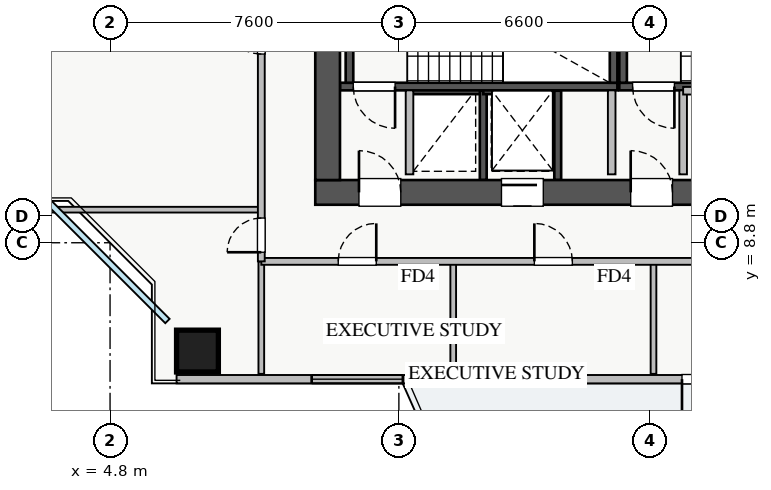
"""IFC4 building model, lengths in metres.
Left out: names, types, materials, properties, quantities, classifications, styles, units other than length and angle.
Written with IfcOpenShell. Run it as: python <this file> out.ifc"""

import sys

from ifc_helpers import new_model, si_unit, direction, frame, frame_2d, origin, origin_2d, place, context, subcontext, project, spatial, rectangle, extrude, source, transform, mapped, element, fill, save


model = new_model("IFC4")
c1 = context("Model", 3, precision=1e-05, world=origin(), true_north=direction((0.0, 1.0)))
c2 = subcontext(c1, "Body", "Model", "MODEL_VIEW")
j1 = project(units=[si_unit("LENGTHUNIT", "METRE"), si_unit("PLANEANGLEUNIT", "RADIAN")], contexts=[c1])
p1 = place(None, origin())
s1 = spatial("IfcSite", under=j1, at=p1, CompositionType="ELEMENT")
p2 = place(p1, origin())
s2 = spatial("IfcBuilding", under=s1, at=p2, CompositionType="ELEMENT")
p3 = place(p2, frame((0.0, 0.0, 110.0)))
s3 = spatial("IfcBuildingStorey", under=s2, at=p3, CompositionType="ELEMENT", Elevation=110.0)
p4 = place(p3, frame((12.68, 12.8, 0.0), z_axis=(0.0, 0.0, 1.0), x_axis=(1.0, 0.0, 0.0)))
e1 = element("IfcWall", 1, at=p4, inside=s3, PredefinedType="SHEAR", context=c2, shape_type="SweptSolid", body=[
    extrude(rectangle(XDim=1.94, YDim=0.18, at=frame_2d((0.97, 0.0))), origin(), (0.0, 0.0, 1.0), 3.07),
])
p5 = place(p3, frame((14.62, 10.45, 0.0), z_axis=(0.0, 0.0, 1.0), x_axis=(0.0, 1.0, 0.0)))
e2 = element("IfcWall", 2, at=p5, inside=s3, PredefinedType="SHEAR", context=c2, shape_type="SweptSolid", body=[
    extrude(rectangle(XDim=2.35, YDim=0.18, at=frame_2d((1.175, 0.0))), origin(), (0.0, 0.0, 1.0), 3.07),
])
p6 = place(p3, frame((14.62, 12.8, 0.0), z_axis=(0.0, 0.0, 1.0), x_axis=(1.0, 0.0, 0.0)))
e3 = element("IfcWall", 3, at=p6, inside=s3, PredefinedType="SHEAR", context=c2, shape_type="SweptSolid", body=[
    extrude(rectangle(XDim=1.96, YDim=0.18, at=frame_2d((0.98, 0.0))), origin(), (0.0, 0.0, 1.0), 3.07),
])
p7 = place(p3, frame((16.58, 10.45, 0.0), z_axis=(0.0, 0.0, 1.0), x_axis=(0.0, 1.0, 0.0)))
e4 = element("IfcWall", 4, at=p7, inside=s3, PredefinedType="SHEAR", context=c2, shape_type="SweptSolid", body=[
    extrude(rectangle(XDim=2.35, YDim=0.18, at=frame_2d((1.175, 0.0))), origin(), (0.0, 0.0, 1.0), 3.07),
])
p8 = place(p3, frame((10.85, 12.91, 0.0), z_axis=(0.0, 0.0, 1.0), x_axis=(1.0, 0.0, 0.0)))
e5 = element("IfcWall", 5, at=p8, inside=s3, PredefinedType="SHEAR", context=c2, shape_type="SweptSolid", body=[
    extrude(rectangle(XDim=7.3, YDim=0.2, at=frame_2d((3.65, 0.0))), origin(), (0.0, 0.0, 1.0), 3.25),
])
p9 = place(p8, frame((0.35, 0.0, 0.0)))
e6 = element("IfcOpeningElement", 6, at=p9, cuts=e5, PredefinedType="OPENING", context=c2, shape_type="SweptSolid", body=[
    extrude(rectangle(XDim=1.1, YDim=2.05, at=frame_2d((0.55, 1.025))), frame((0.0, 0.11, 0.0), z_axis=(0.0, -1.0, 0.0), x_axis=(1.0, 0.0, 0.0)), (0.0, 0.0, 1.0), 0.22),
])
for number, where, z_axis, x_axis in (
    (7, (11.1, 13.01, 0.0), (0.0, 0.0, 1.0), (0.0, 1.0, 0.0)),
    (8, (18.05, 13.01, 0.0), (0.0, 0.0, 1.0), (0.0, 1.0, 0.0)),
):
    element("IfcWall", number, at=place(p3, frame(where, z_axis=z_axis, x_axis=x_axis)), inside=s3, PredefinedType="SHEAR", context=c2, shape_type="SweptSolid", body=[
        extrude(rectangle(XDim=2.94, YDim=0.2, at=frame_2d((1.47, 0.0))), origin(), (0.0, 0.0, 1.0), 3.25),
    ])
p10 = place(p3, frame((18.2, 12.91, 0.0), z_axis=(0.0, 0.0, 1.0), x_axis=(1.0, 0.0, 0.0)))
e9 = element("IfcWall", 9, at=p10, inside=s3, PredefinedType="SHEAR", context=c2, shape_type="SweptSolid", body=[
    extrude(rectangle(XDim=7.15, YDim=0.2, at=frame_2d((3.575, 0.0))), origin(), (0.0, 0.0, 1.0), 3.25),
])
p11 = place(p10, frame((0.35, 0.0, 0.0)))
e10 = element("IfcOpeningElement", 10, at=p11, cuts=e9, PredefinedType="OPENING", context=c2, shape_type="SweptSolid", body=[
    extrude(rectangle(XDim=1.1, YDim=2.05, at=frame_2d((0.55, 1.025))), frame((0.0, 0.11, 0.0), z_axis=(0.0, -1.0, 0.0), x_axis=(1.0, 0.0, 0.0)), (0.0, 0.0, 1.0), 0.22),
])
p12 = place(p3, frame((18.3, 13.01, 0.0), z_axis=(0.0, 0.0, 1.0), x_axis=(0.0, 1.0, 0.0)))
e11 = element("IfcWall", 11, at=p12, inside=s3, PredefinedType="SHEAR", context=c2, shape_type="SweptSolid", body=[
    extrude(rectangle(XDim=2.94, YDim=0.2, at=frame_2d((1.47, 0.0))), origin(), (0.0, 0.0, 1.0), 3.25),
])
p13 = place(p3, frame((10.2, 10.125, 0.0), z_axis=(0.0, 0.0, 1.0), x_axis=(1.0, 0.0, 0.0)))
e12 = element("IfcWall", 12, at=p13, inside=s3, PredefinedType="SHEAR", context=c2, shape_type="SweptSolid", body=[
    extrude(rectangle(XDim=17.6, YDim=0.65, at=frame_2d((8.8, 0.0))), origin(), (0.0, 0.0, 1.0), 3.25),
])
p14 = place(p13, frame((1.15, 0.0, 0.0)))
e13 = element("IfcOpeningElement", 13, at=p14, cuts=e12, PredefinedType="OPENING", context=c2, shape_type="SweptSolid", body=[
    extrude(rectangle(XDim=1.1, YDim=2.05, at=frame_2d((0.55, 1.025))), frame((0.0, 0.335, 0.0), z_axis=(0.0, -1.0, 0.0), x_axis=(1.0, 0.0, 0.0)), (0.0, 0.0, 1.0), 0.67),
])
p15 = place(p13, frame((8.3, 0.0, 0.0)))
e14 = element("IfcOpeningElement", 14, at=p15, cuts=e12, PredefinedType="OPENING", context=c2, shape_type="SweptSolid", body=[
    extrude(rectangle(XDim=1.1, YDim=2.05, at=frame_2d((0.55, 1.025))), frame((0.0, 0.335, 0.0), z_axis=(0.0, -1.0, 0.0), x_axis=(1.0, 0.0, 0.0)), (0.0, 0.0, 1.0), 0.67),
])
p16 = place(p13, frame((4.9, 0.0, 0.0)))
e15 = element("IfcOpeningElement", 15, at=p16, cuts=e12, PredefinedType="OPENING", context=c2, shape_type="SweptSolid", body=[
    extrude(rectangle(XDim=1.1, YDim=2.05, at=frame_2d((0.55, 1.025))), frame((0.0, 0.335, 0.0), z_axis=(0.0, -1.0, 0.0), x_axis=(1.0, 0.0, 0.0)), (0.0, 0.0, 1.0), 0.67),
])
p17 = place(p13, frame((14.74, 0.0, 0.0)))
e16 = element("IfcOpeningElement", 16, at=p17, cuts=e12, PredefinedType="OPENING", context=c2, shape_type="SweptSolid", body=[
    extrude(rectangle(XDim=1.0, YDim=2.05, at=frame_2d((0.5, 1.025))), frame((0.0, 0.335, 0.0), z_axis=(0.0, -1.0, 0.0), x_axis=(1.0, 0.0, 0.0)), (0.0, 0.0, 1.0), 0.67),
])
p18 = place(p13, frame((10.64, 0.0, 0.0)))
e17 = element("IfcOpeningElement", 17, at=p18, cuts=e12, PredefinedType="OPENING", context=c2, shape_type="SweptSolid", body=[
    extrude(rectangle(XDim=1.0, YDim=2.05, at=frame_2d((0.5, 1.025))), frame((0.0, 0.335, 0.0), z_axis=(0.0, -1.0, 0.0), x_axis=(1.0, 0.0, 0.0)), (0.0, 0.0, 1.0), 0.67),
])
p19 = place(p13, frame((13.09, 0.0, 0.0)))
e18 = element("IfcOpeningElement", 18, at=p19, cuts=e12, PredefinedType="OPENING", context=c2, shape_type="SweptSolid", body=[
    extrude(rectangle(XDim=1.0, YDim=2.05, at=frame_2d((0.5, 1.025))), frame((0.0, 0.335, 0.0), z_axis=(0.0, -1.0, 0.0), x_axis=(1.0, 0.0, 0.0)), (0.0, 0.0, 1.0), 0.67),
])
p20 = place(p3, frame((10.525, 10.45, 0.0), z_axis=(0.0, 0.0, 1.0), x_axis=(0.0, 1.0, 0.0)))
e19 = element("IfcWall", 19, at=p20, inside=s3, PredefinedType="SHEAR", context=c2, shape_type="SweptSolid", body=[
    extrude(rectangle(XDim=5.9, YDim=0.65, at=frame_2d((2.95, 0.0))), origin(), (0.0, 0.0, 1.0), 3.25),
])
m1 = source(origin(), c2, "Body", "SweptSolid", [
    extrude(rectangle(XDim=1.1, YDim=1.1, at=origin_2d()), origin(), (0.0, 0.0, 1.0), 3.25),
])
p21 = place(p3, frame((7.1, 5.95, 0.0), z_axis=(0.0, 0.0, 1.0), x_axis=(1.0, 0.0, 0.0)))
e20 = element("IfcColumn", 20, at=p21, inside=s3, PredefinedType="COLUMN", context=c2, shape_type="MappedRepresentation", body=[
    mapped(m1, transform((0.0, 0.0, 0.0), x_axis=(1.0, 0.0, 0.0), y_axis=(0.0, 1.0, 0.0), z_axis=(0.0, 0.0, 1.0), scale=1.0)),
])
p22 = place(p3, frame((6.55, 5.21, 0.0), z_axis=(0.0, 0.0, 1.0), x_axis=(1.0, 0.0, 0.0)))
e21 = element("IfcWall", 21, at=p22, inside=s3, PredefinedType="STANDARD", context=c2, shape_type="SweptSolid", body=[
    extrude(rectangle(XDim=24.9, YDim=0.22, at=frame_2d((12.45, 0.0))), origin(), (0.0, 0.0, 1.0), 2.61),
])
p23 = place(p22, frame((13.3, 0.0, 0.0)))
e22 = element("IfcOpeningElement", 22, at=p23, cuts=e21, PredefinedType="OPENING", context=c2, shape_type="SweptSolid", body=[
    extrude(rectangle(XDim=1.2, YDim=2.1, at=frame_2d((0.6, 1.05))), frame((0.0, 0.12, 0.0), z_axis=(0.0, -1.0, 0.0), x_axis=(1.0, 0.0, 0.0)), (0.0, 0.0, 1.0), 0.24),
])
p24 = place(p22, frame((3.555, 0.0, 0.9)))
e23 = element("IfcOpeningElement", 23, at=p24, cuts=e21, PredefinedType="OPENING", context=c2, shape_type="SweptSolid", body=[
    extrude(rectangle(XDim=2.4, YDim=1.5, at=frame_2d((1.2, 0.75))), frame((0.0, 0.12, 0.0), z_axis=(0.0, -1.0, 0.0), x_axis=(1.0, 0.0, 0.0)), (0.0, 0.0, 1.0), 0.24),
])
p25 = place(p22, frame((8.438, 0.0, 0.9)))
e24 = element("IfcOpeningElement", 24, at=p25, cuts=e21, PredefinedType="OPENING", context=c2, shape_type="SweptSolid", body=[
    extrude(rectangle(XDim=1.8, YDim=1.45, at=frame_2d((0.9, 0.725))), frame((0.0, 0.12, 0.0), z_axis=(0.0, -1.0, 0.0), x_axis=(1.0, 0.0, 0.0)), (0.0, 0.0, 1.0), 0.24),
])
p26 = place(p22, frame((14.813, 0.0, 0.9)))
e25 = element("IfcOpeningElement", 25, at=p26, cuts=e21, PredefinedType="OPENING", context=c2, shape_type="SweptSolid", body=[
    extrude(rectangle(XDim=1.5, YDim=1.45, at=frame_2d((0.75, 0.725))), frame((0.0, 0.12, 0.0), z_axis=(0.0, -1.0, 0.0), x_axis=(1.0, 0.0, 0.0)), (0.0, 0.0, 1.0), 0.24),
])
p27 = place(p22, frame((20.738, 0.0, 0.9)))
e26 = element("IfcOpeningElement", 26, at=p27, cuts=e21, PredefinedType="OPENING", context=c2, shape_type="SweptSolid", body=[
    extrude(rectangle(XDim=2.1, YDim=1.48, at=frame_2d((1.05, 0.74))), frame((0.0, 0.12, 0.0), z_axis=(0.0, -1.0, 0.0), x_axis=(1.0, 0.0, 0.0)), (0.0, 0.0, 1.0), 0.24),
])
for number, where, z_axis, x_axis in (
    (27, (12.68, 10.6, 0.0), (0.0, 0.0, 1.0), (0.0, 1.0, 0.0)),
    (28, (18.0, 10.6, 0.0), (0.0, 0.0, 1.0), (0.0, 1.0, 0.0)),
    (29, (19.88, 10.6, 0.0), (0.0, 0.0, 1.0), (0.0, 1.0, 0.0)),
):
    element("IfcWall", number, at=place(p3, frame(where, z_axis=z_axis, x_axis=x_axis)), inside=s3, PredefinedType="PARTITIONING", context=c2, shape_type="SweptSolid", body=[
        extrude(rectangle(XDim=2.21, YDim=0.2, at=frame_2d((1.105, 0.0))), origin(), (0.0, 0.0, 1.0), 3.07),
    ])
p28 = place(p3, frame((19.88, 12.8, 0.0), z_axis=(0.0, 0.0, 1.0), x_axis=(1.0, 0.0, 0.0)))
e30 = element("IfcWall", 30, at=p28, inside=s3, PredefinedType="PARTITIONING", context=c2, shape_type="SweptSolid", body=[
    extrude(rectangle(XDim=1.87, YDim=0.2, at=frame_2d((0.935, 0.0))), origin(), (0.0, 0.0, 1.0), 3.07),
])
p29 = place(p3, frame((13.83, 5.35, 0.0), z_axis=(0.0, 0.0, 1.0), x_axis=(0.0, 1.0, 0.0)))
e31 = element("IfcWall", 31, at=p29, inside=s3, PredefinedType="PARTITIONING", context=c2, shape_type="SweptSolid", body=[
    extrude(rectangle(XDim=2.96, YDim=0.15, at=frame_2d((1.48, 0.0))), origin(), (0.0, 0.0, 1.0), 3.07),
])
p30 = place(p3, frame((19.1, 5.35, 0.0), z_axis=(0.0, 0.0, 1.0), x_axis=(0.0, 1.0, 0.0)))
e32 = element("IfcWall", 32, at=p30, inside=s3, PredefinedType="PARTITIONING", context=c2, shape_type="SweptSolid", body=[
    extrude(rectangle(XDim=2.96, YDim=0.15, at=frame_2d((1.48, 0.0))), origin(), (0.0, 0.0, 1.0), 2.765),
])
p31 = place(p3, frame((8.78, 5.35, 0.0), z_axis=(0.0, 0.0, 1.0), x_axis=(0.0, 1.0, 0.0)))
e33 = element("IfcWall", 33, at=p31, inside=s3, PredefinedType="PARTITIONING", context=c2, shape_type="SweptSolid", body=[
    extrude(rectangle(XDim=2.96, YDim=0.15, at=frame_2d((1.48, 0.0))), origin(), (0.0, 0.0, 1.0), 3.07),
])
p32 = place(p3, frame((8.78, 8.31, 0.0), z_axis=(0.0, 0.0, 1.0), x_axis=(1.0, 0.0, 0.0)))
e34 = element("IfcWall", 34, at=p32, inside=s3, PredefinedType="PARTITIONING", context=c2, shape_type="SweptSolid", body=[
    extrude(rectangle(XDim=23.54, YDim=0.18, at=frame_2d((11.77, 0.0))), origin(), (0.0, 0.0, 1.0), 3.07),
])
p33 = place(p32, frame((2.025, 0.0, 0.0)))
e35 = element("IfcOpeningElement", 35, at=p33, cuts=e34, PredefinedType="OPENING", context=c2, shape_type="SweptSolid", body=[
    extrude(rectangle(XDim=1.0, YDim=2.05, at=frame_2d((0.5, 1.025))), frame((0.0, 0.1, 0.0), z_axis=(0.0, -1.0, 0.0), x_axis=(1.0, 0.0, 0.0)), (0.0, 0.0, 1.0), 0.2),
])
p34 = place(p32, frame((7.185, 0.0, 0.0)))
e36 = element("IfcOpeningElement", 36, at=p34, cuts=e34, PredefinedType="OPENING", context=c2, shape_type="SweptSolid", body=[
    extrude(rectangle(XDim=1.0, YDim=2.05, at=frame_2d((0.5, 1.025))), frame((0.0, 0.1, 0.0), z_axis=(0.0, -1.0, 0.0), x_axis=(1.0, 0.0, 0.0)), (0.0, 0.0, 1.0), 0.2),
])
p35 = place(p32, frame((13.36, 0.0, 0.0)))
e37 = element("IfcOpeningElement", 37, at=p35, cuts=e34, PredefinedType="OPENING", context=c2, shape_type="SweptSolid", body=[
    extrude(rectangle(XDim=1.0, YDim=2.05, at=frame_2d((0.5, 1.025))), frame((0.0, 0.1, 0.0), z_axis=(0.0, -1.0, 0.0), x_axis=(1.0, 0.0, 0.0)), (0.0, 0.0, 1.0), 0.2),
])
p36 = place(p32, frame((19.8, 0.0, 0.0)))
e38 = element("IfcOpeningElement", 38, at=p36, cuts=e34, PredefinedType="OPENING", context=c2, shape_type="SweptSolid", body=[
    extrude(rectangle(XDim=1.0, YDim=2.05, at=frame_2d((0.5, 1.025))), frame((0.0, 0.1, 0.0), z_axis=(0.0, -1.0, 0.0), x_axis=(1.0, 0.0, 0.0)), (0.0, 0.0, 1.0), 0.2),
])
p37 = place(p3, frame((1.35, 9.67, 0.0), z_axis=(0.0, 0.0, 1.0), x_axis=(1.0, 0.0, 0.0)))
e39 = element("IfcWall", 39, at=p37, inside=s3, PredefinedType="PARTITIONING", context=c2, shape_type="SweptSolid", body=[
    extrude(rectangle(XDim=7.43, YDim=0.15, at=frame_2d((3.715, 0.0))), origin(), (0.0, 0.0, 1.0), 3.07),
])
p38 = place(p3, frame((8.78, 8.31, 0.0), z_axis=(0.0, 0.0, 1.0), x_axis=(0.0, 1.0, 0.0)))
e40 = element("IfcWall", 40, at=p38, inside=s3, PredefinedType="PARTITIONING", context=c2, shape_type="SweptSolid", body=[
    extrude(rectangle(XDim=29.34, YDim=0.18, at=frame_2d((14.67, 0.0))), origin(), (0.0, 0.0, 1.0), 3.07),
])
p39 = place(p38, frame((28.045, 0.0, 0.0)))
e41 = element("IfcOpeningElement", 41, at=p39, cuts=e40, PredefinedType="OPENING", context=c2, shape_type="SweptSolid", body=[
    extrude(rectangle(XDim=0.9, YDim=2.05, at=frame_2d((0.45, 1.025))), frame((0.0, 0.1, 0.0), z_axis=(0.0, -1.0, 0.0), x_axis=(1.0, 0.0, 0.0)), (0.0, 0.0, 1.0), 0.2),
])
p40 = place(p38, frame((0.24, 0.0, 0.0)))
e42 = element("IfcOpeningElement", 42, at=p40, cuts=e40, PredefinedType="OPENING", context=c2, shape_type="SweptSolid", body=[
    extrude(rectangle(XDim=0.9, YDim=2.05, at=frame_2d((0.45, 1.025))), frame((0.0, 0.1, 0.0), z_axis=(0.0, -1.0, 0.0), x_axis=(1.0, 0.0, 0.0)), (0.0, 0.0, 1.0), 0.2),
])
p41 = place(p38, frame((5.455, 0.0, 0.0)))
e43 = element("IfcOpeningElement", 43, at=p41, cuts=e40, PredefinedType="OPENING", context=c2, shape_type="SweptSolid", body=[
    extrude(rectangle(XDim=1.0, YDim=2.05, at=frame_2d((0.5, 1.025))), frame((0.0, 0.1, 0.0), z_axis=(0.0, -1.0, 0.0), x_axis=(1.0, 0.0, 0.0)), (0.0, 0.0, 1.0), 0.2),
])
p42 = place(p38, frame((11.865, 0.0, 0.0)))
e44 = element("IfcOpeningElement", 44, at=p42, cuts=e40, PredefinedType="OPENING", context=c2, shape_type="SweptSolid", body=[
    extrude(rectangle(XDim=1.0, YDim=2.05, at=frame_2d((0.5, 1.025))), frame((0.0, 0.1, 0.0), z_axis=(0.0, -1.0, 0.0), x_axis=(1.0, 0.0, 0.0)), (0.0, 0.0, 1.0), 0.2),
])
p43 = place(p38, frame((20.315, 0.0, 0.0)))
e45 = element("IfcOpeningElement", 45, at=p43, cuts=e40, PredefinedType="OPENING", context=c2, shape_type="SweptSolid", body=[
    extrude(rectangle(XDim=1.0, YDim=2.05, at=frame_2d((0.5, 1.025))), frame((0.0, 0.1, 0.0), z_axis=(0.0, -1.0, 0.0), x_axis=(1.0, 0.0, 0.0)), (0.0, 0.0, 1.0), 0.2),
])
m2 = source(origin(), c2, "Body", "SweptSolid", [
    extrude(rectangle(XDim=1.2, YDim=2.1, at=frame_2d((0.6, 1.05))), frame((0.0, 0.025, 0.0), z_axis=(0.0, -1.0, 0.0), x_axis=(1.0, 0.0, 0.0)), (0.0, 0.0, 1.0), 0.05),
])
p44 = place(p23, frame((1.2, 0.0, 0.0), z_axis=(0.0, 0.0, 1.0), x_axis=(-1.0, 0.0, 0.0)))
e46 = element("IfcDoor", 46, at=p44, inside=s3, OperationType="SINGLE_SWING_LEFT", PredefinedType="DOOR", context=c2, shape_type="MappedRepresentation", body=[
    mapped(m2, transform((0.0, 0.0, 0.0), x_axis=(1.0, 0.0, 0.0), y_axis=(0.0, 1.0, 0.0), z_axis=(0.0, 0.0, 1.0), scale=1.0)),
])
fill(e22, e46)
m3 = source(origin(), c2, "Body", "SweptSolid", [
    extrude(rectangle(XDim=2.4, YDim=1.5, at=frame_2d((1.2, 0.75))), frame((0.0, 0.03, 0.0), z_axis=(0.0, -1.0, 0.0), x_axis=(1.0, 0.0, 0.0)), (0.0, 0.0, 1.0), 0.06),
])
p45 = place(p24, origin())
e47 = element("IfcWindow", 47, at=p45, inside=s3, PartitioningType="TRIPLE_PANEL_VERTICAL", PredefinedType="WINDOW", context=c2, shape_type="MappedRepresentation", body=[
    mapped(m3, transform((0.0, 0.0, 0.0), x_axis=(1.0, 0.0, 0.0), y_axis=(0.0, 1.0, 0.0), z_axis=(0.0, 0.0, 1.0), scale=1.0)),
])
fill(e23, e47)
m4 = source(origin(), c2, "Body", "SweptSolid", [
    extrude(rectangle(XDim=1.8, YDim=1.45, at=frame_2d((0.9, 0.725))), frame((0.0, 0.03, 0.0), z_axis=(0.0, -1.0, 0.0), x_axis=(1.0, 0.0, 0.0)), (0.0, 0.0, 1.0), 0.06),
])
p46 = place(p25, origin())
e48 = element("IfcWindow", 48, at=p46, inside=s3, PartitioningType="DOUBLE_PANEL_VERTICAL", PredefinedType="WINDOW", context=c2, shape_type="MappedRepresentation", body=[
    mapped(m4, transform((0.0, 0.0, 0.0), x_axis=(1.0, 0.0, 0.0), y_axis=(0.0, 1.0, 0.0), z_axis=(0.0, 0.0, 1.0), scale=1.0)),
])
fill(e24, e48)
m5 = source(origin(), c2, "Body", "SweptSolid", [
    extrude(rectangle(XDim=1.1, YDim=2.05, at=frame_2d((0.55, 1.025))), frame((0.0, 0.025, 0.0), z_axis=(0.0, -1.0, 0.0), x_axis=(1.0, 0.0, 0.0)), (0.0, 0.0, 1.0), 0.05),
])
p47 = place(p14, origin())
e49 = element("IfcDoor", 49, at=p47, inside=s3, OperationType="SINGLE_SWING_LEFT", PredefinedType="DOOR", context=c2, shape_type="MappedRepresentation", body=[
    mapped(m5, transform((0.0, 0.0, 0.0), x_axis=(1.0, 0.0, 0.0), y_axis=(0.0, 1.0, 0.0), z_axis=(0.0, 0.0, 1.0), scale=1.0)),
])
fill(e13, e49)
p48 = place(p9, frame((1.1, 0.0, 0.0), z_axis=(0.0, 0.0, 1.0), x_axis=(-1.0, 0.0, 0.0)))
e50 = element("IfcDoor", 50, at=p48, inside=s3, OperationType="SINGLE_SWING_RIGHT", PredefinedType="DOOR", context=c2, shape_type="MappedRepresentation", body=[
    mapped(m5, transform((0.0, 0.0, 0.0), x_axis=(1.0, 0.0, 0.0), y_axis=(0.0, 1.0, 0.0), z_axis=(0.0, 0.0, 1.0), scale=1.0)),
])
fill(e6, e50)
p49 = place(p15, origin())
e51 = element("IfcDoor", 51, at=p49, inside=s3, OperationType="SINGLE_SWING_LEFT", PredefinedType="DOOR", context=c2, shape_type="MappedRepresentation", body=[
    mapped(m5, transform((0.0, 0.0, 0.0), x_axis=(1.0, 0.0, 0.0), y_axis=(0.0, 1.0, 0.0), z_axis=(0.0, 0.0, 1.0), scale=1.0)),
])
fill(e14, e51)
p50 = place(p11, frame((1.1, 0.0, 0.0), z_axis=(0.0, 0.0, 1.0), x_axis=(-1.0, 0.0, 0.0)))
e52 = element("IfcDoor", 52, at=p50, inside=s3, OperationType="SINGLE_SWING_RIGHT", PredefinedType="DOOR", context=c2, shape_type="MappedRepresentation", body=[
    mapped(m5, transform((0.0, 0.0, 0.0), x_axis=(1.0, 0.0, 0.0), y_axis=(0.0, 1.0, 0.0), z_axis=(0.0, 0.0, 1.0), scale=1.0)),
])
fill(e10, e52)
p51 = place(p16, origin())
e53 = element("IfcDoor", 53, at=p51, inside=s3, OperationType="SLIDING_TO_RIGHT", PredefinedType="DOOR", context=c2, shape_type="MappedRepresentation", body=[
    mapped(m5, transform((0.0, 0.0, 0.0), x_axis=(1.0, 0.0, 0.0), y_axis=(0.0, 1.0, 0.0), z_axis=(0.0, 0.0, 1.0), scale=1.0)),
])
fill(e15, e53)
m6 = source(origin(), c2, "Body", "SweptSolid", [
    extrude(rectangle(XDim=1.0, YDim=2.05, at=frame_2d((0.5, 1.025))), frame((0.0, 0.025, 0.0), z_axis=(0.0, -1.0, 0.0), x_axis=(1.0, 0.0, 0.0)), (0.0, 0.0, 1.0), 0.05),
])
p52 = place(p33, origin())
e54 = element("IfcDoor", 54, at=p52, inside=s3, OperationType="SINGLE_SWING_RIGHT", PredefinedType="DOOR", context=c2, shape_type="MappedRepresentation", body=[
    mapped(m6, transform((0.0, 0.0, 0.0), x_axis=(1.0, 0.0, 0.0), y_axis=(0.0, 1.0, 0.0), z_axis=(0.0, 0.0, 1.0), scale=1.0)),
])
fill(e35, e54)
p53 = place(p34, origin())
e55 = element("IfcDoor", 55, at=p53, inside=s3, OperationType="SINGLE_SWING_LEFT", PredefinedType="DOOR", context=c2, shape_type="MappedRepresentation", body=[
    mapped(m6, transform((0.0, 0.0, 0.0), x_axis=(1.0, 0.0, 0.0), y_axis=(0.0, 1.0, 0.0), z_axis=(0.0, 0.0, 1.0), scale=1.0)),
])
fill(e36, e55)
m7 = source(origin(), c2, "Body", "SweptSolid", [
    extrude(rectangle(XDim=0.9, YDim=2.05, at=frame_2d((0.45, 1.025))), frame((0.0, 0.025, 0.0), z_axis=(0.0, -1.0, 0.0), x_axis=(1.0, 0.0, 0.0)), (0.0, 0.0, 1.0), 0.05),
])
p54 = place(p40, origin())
e56 = element("IfcDoor", 56, at=p54, inside=s3, OperationType="SINGLE_SWING_LEFT", PredefinedType="DOOR", context=c2, shape_type="MappedRepresentation", body=[
    mapped(m7, transform((0.0, 0.0, 0.0), x_axis=(1.0, 0.0, 0.0), y_axis=(0.0, 1.0, 0.0), z_axis=(0.0, 0.0, 1.0), scale=1.0)),
])
fill(e42, e56)
p55 = place(p41, origin())
e57 = element("IfcDoor", 57, at=p55, inside=s3, OperationType="SINGLE_SWING_RIGHT", PredefinedType="DOOR", context=c2, shape_type="MappedRepresentation", body=[
    mapped(m6, transform((0.0, 0.0, 0.0), x_axis=(1.0, 0.0, 0.0), y_axis=(0.0, 1.0, 0.0), z_axis=(0.0, 0.0, 1.0), scale=1.0)),
])
fill(e43, e57)
save(model, sys.argv[1])
